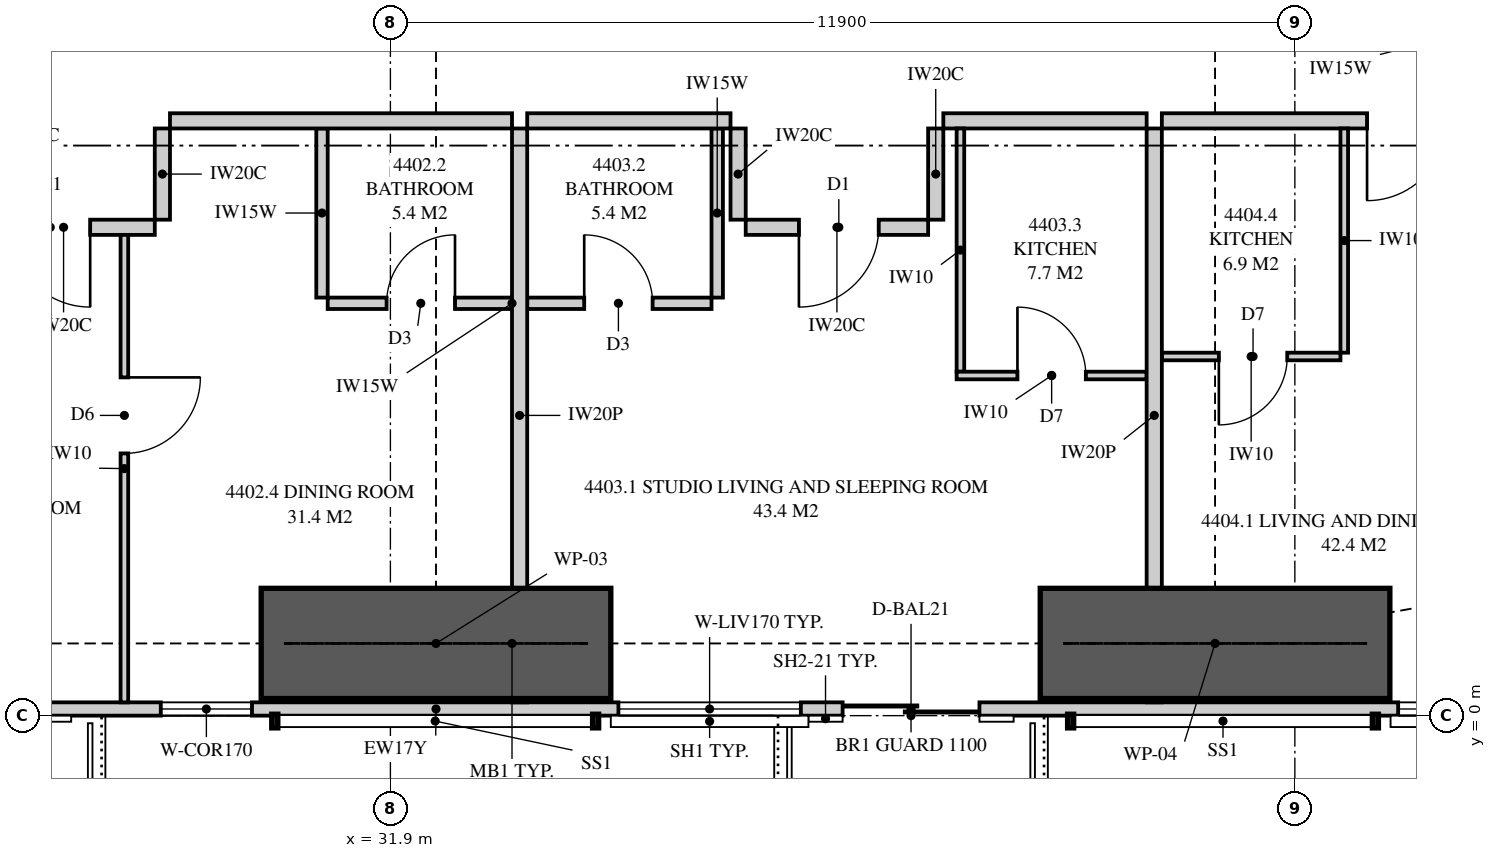
"""IFC4 building model, lengths in metres.
Left out: names, types, materials, properties, quantities, classifications, styles, units other than length and angle.
Written with IfcOpenShell. Run it as: python <this file> out.ifc"""

import sys

from ifc_helpers import new_model, si_unit, direction, frame, frame_2d, origin, place, context, subcontext, project, spatial, polyline, rectangle, outline, extrude, element, fill, save


model = new_model("IFC4")
c1 = context("Model", 3, precision=1e-05, world=origin(), true_north=direction((0.0, 1.0)))
c2 = subcontext(c1, "Body", "Model", "MODEL_VIEW")
j1 = project(units=[si_unit("LENGTHUNIT", "METRE"), si_unit("PLANEANGLEUNIT", "RADIAN")], contexts=[c1])
p1 = place(None, origin())
s1 = spatial("IfcSite", under=j1, at=p1, CompositionType="ELEMENT")
p2 = place(p1, origin())
s2 = spatial("IfcBuilding", under=s1, at=p2, CompositionType="ELEMENT")
p3 = place(p2, frame((0.0, 0.0, 164.4)))
s3 = spatial("IfcBuildingStorey", under=s2, at=p3, CompositionType="ELEMENT", Elevation=164.4)
p4 = place(p3, frame((15.051, 0.087, 0.0), z_axis=(0.0, 0.0, 1.0), x_axis=(1.0, 0.0, 0.0)))
e1 = element("IfcWall", 1, at=p4, inside=s3, PredefinedType="SOLIDWALL", context=c2, shape_type="SweptSolid", body=[
    extrude(outline(polyline([(0.0, 0.0), (34.897, 0.0), (34.897, 3.11), (27.91, 3.11), (27.91, 2.15), (27.836, 2.15), (27.836, 3.11), (27.699, 3.11), (27.699, 2.15), (7.199, 2.15), (7.199, 3.11), (7.062, 3.11), (7.062, 2.15), (6.987, 2.15), (6.987, 3.11), (0.0, 3.11), (0.0, 0.0)])), frame((0.0, 0.087, 0.0), z_axis=(0.0, -1.0, 0.0), x_axis=(1.0, 0.0, 0.0)), (0.0, 0.0, 1.0), 0.175),
])
p5 = place(p4, frame((1.824, 0.0, 0.4)))
e2 = element("IfcOpeningElement", 2, at=p5, cuts=e1, PredefinedType="OPENING", context=c2, shape_type="SweptSolid", body=[
    extrude(rectangle(XDim=2.4, YDim=1.7, at=frame_2d((1.2, 0.85))), frame((0.0, 0.097, 0.0), z_axis=(0.0, -1.0, 0.0), x_axis=(1.0, 0.0, 0.0)), (0.0, 0.0, 1.0), 0.195),
])
p6 = place(p4, frame((10.399, 0.0, 0.0)))
e3 = element("IfcOpeningElement", 3, at=p6, cuts=e1, PredefinedType="OPENING", context=c2, shape_type="SweptSolid", body=[
    extrude(rectangle(XDim=1.8, YDim=2.1, at=frame_2d((0.9, 1.05))), frame((0.0, 0.097, 0.0), z_axis=(0.0, -1.0, 0.0), x_axis=(1.0, 0.0, 0.0)), (0.0, 0.0, 1.0), 0.195),
])
p7 = place(p4, frame((13.827, 0.0, 0.4)))
e4 = element("IfcOpeningElement", 4, at=p7, cuts=e1, PredefinedType="OPENING", context=c2, shape_type="SweptSolid", body=[
    extrude(rectangle(XDim=1.2, YDim=1.7, at=frame_2d((0.6, 0.85))), frame((0.0, 0.097, 0.0), z_axis=(0.0, -1.0, 0.0), x_axis=(1.0, 0.0, 0.0)), (0.0, 0.0, 1.0), 0.195),
])
p8 = place(p4, frame((22.799, 0.0, 0.0)))
e5 = element("IfcOpeningElement", 5, at=p8, cuts=e1, PredefinedType="OPENING", context=c2, shape_type="SweptSolid", body=[
    extrude(rectangle(XDim=1.8, YDim=2.1, at=frame_2d((0.9, 1.05))), frame((0.0, 0.097, 0.0), z_axis=(0.0, -1.0, 0.0), x_axis=(1.0, 0.0, 0.0)), (0.0, 0.0, 1.0), 0.195),
])
p9 = place(p4, frame((19.849, 0.0, 0.4)))
e6 = element("IfcOpeningElement", 6, at=p9, cuts=e1, PredefinedType="OPENING", context=c2, shape_type="SweptSolid", body=[
    extrude(rectangle(XDim=2.4, YDim=1.7, at=frame_2d((1.2, 0.85))), frame((0.0, 0.097, 0.0), z_axis=(0.0, -1.0, 0.0), x_axis=(1.0, 0.0, 0.0)), (0.0, 0.0, 1.0), 0.195),
])
p10 = place(p4, frame((30.108, 0.0, 0.4)))
e7 = element("IfcOpeningElement", 7, at=p10, cuts=e1, PredefinedType="OPENING", context=c2, shape_type="SweptSolid", body=[
    extrude(rectangle(XDim=2.4, YDim=1.7, at=frame_2d((1.2, 0.85))), frame((0.0, 0.097, 0.0), z_axis=(0.0, -1.0, 0.0), x_axis=(1.0, 0.0, 0.0)), (0.0, 0.0, 1.0), 0.195),
])
p11 = place(p3, frame((33.6, 0.175, 0.0), z_axis=(0.0, 0.0, 1.0), x_axis=(0.0, 1.0, 0.0)))
e8 = element("IfcWall", 8, at=p11, inside=s3, PredefinedType="PARTITIONING", context=c2, shape_type="SweptSolid", body=[
    extrude(outline(polyline([(0.529, 2.15), (0.0, 2.15), (0.0, 0.0), (0.529, 0.0), (0.529, 0.625), (1.021, 0.625), (1.021, 0.0), (7.55, 0.0), (7.55, 3.11), (1.685, 3.11), (1.685, 2.15), (1.021, 2.15), (1.021, 1.525), (0.529, 1.525), (0.529, 2.15)])), frame((0.0, 0.1, 0.0), z_axis=(0.0, -1.0, 0.0), x_axis=(1.0, 0.0, 0.0)), (0.0, 0.0, 1.0), 0.2),
])
p12 = place(p3, frame((31.075, 5.425, 0.0), z_axis=(0.0, 0.0, 1.0), x_axis=(1.0, 0.0, 0.0)))
e9 = element("IfcWall", 9, at=p12, inside=s3, PredefinedType="PLUMBINGWALL", context=c2, shape_type="SweptSolid", body=[
    extrude(outline(polyline([(0.0, 0.0), (2.425, 0.0), (2.425, 3.11), (1.737, 3.11), (1.737, 2.541), (1.113, 2.541), (1.113, 3.11), (0.0, 3.11), (0.0, 0.0)])), frame((0.0, 0.075, 0.0), z_axis=(0.0, -1.0, 0.0), x_axis=(1.0, 0.0, 0.0)), (0.0, 0.0, 1.0), 0.15),
])
p13 = place(p12, frame((0.775, 0.0, 0.0)))
e10 = element("IfcOpeningElement", 10, at=p13, cuts=e9, PredefinedType="OPENING", context=c2, shape_type="SweptSolid", body=[
    extrude(rectangle(XDim=0.9, YDim=2.1, at=frame_2d((0.45, 1.05))), frame((0.0, 0.085, 0.0), z_axis=(0.0, -1.0, 0.0), x_axis=(1.0, 0.0, 0.0)), (0.0, 0.0, 1.0), 0.17),
])
p14 = place(p3, frame((31.0, 5.5, 0.0), z_axis=(0.0, 0.0, 1.0), x_axis=(0.0, 1.0, 0.0)))
e11 = element("IfcWall", 11, at=p14, inside=s3, PredefinedType="PLUMBINGWALL", context=c2, shape_type="SweptSolid", body=[
    extrude(rectangle(XDim=2.225, YDim=0.15, at=frame_2d((1.113, 0.0))), origin(), (0.0, 0.0, 1.0), 3.11),
])
p15 = place(p3, frame((28.4, 0.175, 0.0), z_axis=(0.0, 0.0, 1.0), x_axis=(0.0, 1.0, 0.0)))
e12 = element("IfcWall", 12, at=p15, inside=s3, PredefinedType="PARTITIONING", context=c2, shape_type="SweptSolid", body=[
    extrude(outline(polyline([(0.0, 0.0), (6.15, 0.0), (6.15, 3.11), (1.635, 3.11), (1.635, 2.15), (0.0, 2.15), (0.0, 3.11), (0.0, 0.0)])), frame((0.0, 0.05, 0.0), z_axis=(0.0, -1.0, 0.0), x_axis=(1.0, 0.0, 0.0)), (0.0, 0.0, 1.0), 0.1),
])
p16 = place(p15, frame((3.275, 0.0, 0.0)))
e13 = element("IfcOpeningElement", 13, at=p16, cuts=e12, PredefinedType="OPENING", context=c2, shape_type="SweptSolid", body=[
    extrude(rectangle(XDim=1.0, YDim=2.1, at=frame_2d((0.5, 1.05))), frame((0.0, 0.06, 0.0), z_axis=(0.0, -1.0, 0.0), x_axis=(1.0, 0.0, 0.0)), (0.0, 0.0, 1.0), 0.12),
])
p17 = place(p3, frame((41.95, 0.175, 0.0), z_axis=(0.0, 0.0, 1.0), x_axis=(0.0, 1.0, 0.0)))
e14 = element("IfcWall", 14, at=p17, inside=s3, PredefinedType="PARTITIONING", context=c2, shape_type="SweptSolid", body=[
    extrude(outline(polyline([(0.529, 2.15), (0.0, 2.15), (0.0, 0.0), (0.529, 0.0), (0.529, 0.876), (1.021, 0.876), (1.021, 0.0), (7.55, 0.0), (7.55, 3.11), (1.685, 3.11), (1.685, 2.15), (1.021, 2.15), (1.021, 1.274), (0.529, 1.274), (0.529, 2.15)])), frame((0.0, 0.1, 0.0), z_axis=(0.0, -1.0, 0.0), x_axis=(1.0, 0.0, 0.0)), (0.0, 0.0, 1.0), 0.2),
])
p18 = place(p3, frame((33.7, 7.825, 0.0), z_axis=(0.0, 0.0, 1.0), x_axis=(1.0, 0.0, 0.0)))
e15 = element("IfcWall", 15, at=p18, inside=s3, PredefinedType="PARTITIONING", context=c2, shape_type="SweptSolid", body=[
    extrude(rectangle(XDim=2.675, YDim=0.2, at=frame_2d((1.337, 0.0))), origin(), (0.0, 0.0, 1.0), 3.11),
])
p19 = place(p3, frame((33.7, 5.425, 0.0), z_axis=(0.0, 0.0, 1.0), x_axis=(1.0, 0.0, 0.0)))
e16 = element("IfcWall", 16, at=p19, inside=s3, PredefinedType="PLUMBINGWALL", context=c2, shape_type="SweptSolid", body=[
    extrude(rectangle(XDim=2.425, YDim=0.15, at=frame_2d((1.212, 0.0))), origin(), (0.0, 0.0, 1.0), 3.11),
])
p20 = place(p19, frame((0.75, 0.0, 0.0)))
e17 = element("IfcOpeningElement", 17, at=p20, cuts=e16, PredefinedType="OPENING", context=c2, shape_type="SweptSolid", body=[
    extrude(rectangle(XDim=0.9, YDim=2.1, at=frame_2d((0.45, 1.05))), frame((0.0, 0.085, 0.0), z_axis=(0.0, -1.0, 0.0), x_axis=(1.0, 0.0, 0.0)), (0.0, 0.0, 1.0), 0.17),
])
p21 = place(p3, frame((36.2, 5.5, 0.0), z_axis=(0.0, 0.0, 1.0), x_axis=(0.0, 1.0, 0.0)))
e18 = element("IfcWall", 18, at=p21, inside=s3, PredefinedType="PLUMBINGWALL", context=c2, shape_type="SweptSolid", body=[
    extrude(rectangle(XDim=2.225, YDim=0.15, at=frame_2d((1.113, 0.0))), origin(), (0.0, 0.0, 1.0), 3.11),
])
p22 = place(p3, frame((42.05, 7.825, 0.0), z_axis=(0.0, 0.0, 1.0), x_axis=(1.0, 0.0, 0.0)))
e19 = element("IfcWall", 19, at=p22, inside=s3, PredefinedType="PARTITIONING", context=c2, shape_type="SweptSolid", body=[
    extrude(outline(polyline([(0.0, 0.0), (3.9, 0.0), (3.9, 3.11), (1.037, 3.11), (1.037, 2.541), (0.363, 2.541), (0.363, 3.11), (0.0, 3.11), (0.0, 0.0)])), frame((0.0, 0.1, 0.0), z_axis=(0.0, -1.0, 0.0), x_axis=(1.0, 0.0, 0.0)), (0.0, 0.0, 1.0), 0.2),
])
p23 = place(p22, frame((2.7, 0.0, 0.0)))
e20 = element("IfcOpeningElement", 20, at=p23, cuts=e19, PredefinedType="OPENING", context=c2, shape_type="SweptSolid", body=[
    extrude(rectangle(XDim=1.05, YDim=2.2, at=frame_2d((0.525, 1.1))), frame((0.0, 0.11, 0.0), z_axis=(0.0, -1.0, 0.0), x_axis=(1.0, 0.0, 0.0)), (0.0, 0.0, 1.0), 0.22),
])
p24 = place(p3, frame((42.05, 4.725, 0.0), z_axis=(0.0, 0.0, 1.0), x_axis=(1.0, 0.0, 0.0)))
e21 = element("IfcWall", 21, at=p24, inside=s3, PredefinedType="PARTITIONING", context=c2, shape_type="SweptSolid", body=[
    extrude(outline(polyline([(0.0, 0.0), (2.35, 0.0), (2.35, 3.11), (0.987, 3.11), (0.987, 2.541), (0.413, 2.541), (0.413, 3.11), (0.0, 3.11), (0.0, 0.0)])), frame((0.0, 0.05, 0.0), z_axis=(0.0, -1.0, 0.0), x_axis=(1.0, 0.0, 0.0)), (0.0, 0.0, 1.0), 0.1),
])
p25 = place(p24, frame((0.75, 0.0, 0.0)))
e22 = element("IfcOpeningElement", 22, at=p25, cuts=e21, PredefinedType="OPENING", context=c2, shape_type="SweptSolid", body=[
    extrude(rectangle(XDim=0.9, YDim=2.1, at=frame_2d((0.45, 1.05))), frame((0.0, 0.06, 0.0), z_axis=(0.0, -1.0, 0.0), x_axis=(1.0, 0.0, 0.0)), (0.0, 0.0, 1.0), 0.12),
])
p26 = place(p3, frame((44.45, 4.775, 0.0), z_axis=(0.0, 0.0, 1.0), x_axis=(0.0, 1.0, 0.0)))
e23 = element("IfcWall", 23, at=p26, inside=s3, PredefinedType="PARTITIONING", context=c2, shape_type="SweptSolid", body=[
    extrude(rectangle(XDim=2.95, YDim=0.1, at=frame_2d((1.475, 0.0))), origin(), (0.0, 0.0, 1.0), 3.11),
])
p27 = place(p3, frame((29.0, 7.825, 0.0), z_axis=(0.0, 0.0, 1.0), x_axis=(1.0, 0.0, 0.0)))
e24 = element("IfcWall", 24, at=p27, inside=s3, PredefinedType="PARTITIONING", context=c2, shape_type="SweptSolid", body=[
    extrude(outline(polyline([(0.0, 0.0), (4.5, 0.0), (4.5, 3.11), (3.837, 3.11), (3.837, 2.541), (3.163, 2.541), (3.163, 3.11), (0.0, 3.11), (0.0, 0.0)])), frame((0.0, 0.1, 0.0), z_axis=(0.0, -1.0, 0.0), x_axis=(1.0, 0.0, 0.0)), (0.0, 0.0, 1.0), 0.2),
])
p28 = place(p3, frame((26.4, 6.425, 0.0), z_axis=(0.0, 0.0, 1.0), x_axis=(1.0, 0.0, 0.0)))
e25 = element("IfcWall", 25, at=p28, inside=s3, PredefinedType="PARTITIONING", context=c2, shape_type="SweptSolid", body=[
    extrude(rectangle(XDim=2.4, YDim=0.2, at=frame_2d((1.2, 0.0))), origin(), (0.0, 0.0, 1.0), 3.11),
])
p29 = place(p28, frame((0.5, 0.0, 0.0)))
e26 = element("IfcOpeningElement", 26, at=p29, cuts=e25, PredefinedType="OPENING", context=c2, shape_type="SweptSolid", body=[
    extrude(rectangle(XDim=1.05, YDim=2.2, at=frame_2d((0.525, 1.1))), frame((0.0, 0.11, 0.0), z_axis=(0.0, -1.0, 0.0), x_axis=(1.0, 0.0, 0.0)), (0.0, 0.0, 1.0), 0.22),
])
p30 = place(p3, frame((28.9, 7.725, 0.0), z_axis=(0.0, 0.0, 1.0), x_axis=(0.0, -1.0, 0.0)))
e27 = element("IfcWall", 27, at=p30, inside=s3, PredefinedType="PARTITIONING", context=c2, shape_type="SweptSolid", body=[
    extrude(rectangle(XDim=1.2, YDim=0.2, at=frame_2d((0.6, 0.0))), origin(), (0.0, 0.0, 1.0), 3.11),
])
p31 = place(p3, frame((39.175, 7.825, 0.0), z_axis=(0.0, 0.0, 1.0), x_axis=(1.0, 0.0, 0.0)))
e28 = element("IfcWall", 28, at=p31, inside=s3, PredefinedType="PARTITIONING", context=c2, shape_type="SweptSolid", body=[
    extrude(rectangle(XDim=2.675, YDim=0.2, at=frame_2d((1.337, 0.0))), origin(), (0.0, 0.0, 1.0), 3.11),
])
p32 = place(p3, frame((36.575, 6.425, 0.0), z_axis=(0.0, 0.0, 1.0), x_axis=(1.0, 0.0, 0.0)))
e29 = element("IfcWall", 29, at=p32, inside=s3, PredefinedType="PARTITIONING", context=c2, shape_type="SweptSolid", body=[
    extrude(rectangle(XDim=2.4, YDim=0.2, at=frame_2d((1.2, 0.0))), origin(), (0.0, 0.0, 1.0), 3.11),
])
p33 = place(p32, frame((0.7, 0.0, 0.0)))
e30 = element("IfcOpeningElement", 30, at=p33, cuts=e29, PredefinedType="OPENING", context=c2, shape_type="SweptSolid", body=[
    extrude(rectangle(XDim=1.05, YDim=2.2, at=frame_2d((0.525, 1.1))), frame((0.0, 0.11, 0.0), z_axis=(0.0, -1.0, 0.0), x_axis=(1.0, 0.0, 0.0)), (0.0, 0.0, 1.0), 0.22),
])
for number, where, z_axis, x_axis in (
    (31, (36.475, 7.725, 0.0), (0.0, 0.0, 1.0), (0.0, -1.0, 0.0)),
    (32, (39.075, 7.725, 0.0), (0.0, 0.0, 1.0), (0.0, -1.0, 0.0)),
):
    element("IfcWall", number, at=place(p3, frame(where, z_axis=z_axis, x_axis=x_axis)), inside=s3, PredefinedType="PARTITIONING", context=c2, shape_type="SweptSolid", body=[
        extrude(rectangle(XDim=1.2, YDim=0.2, at=frame_2d((0.6, 0.0))), origin(), (0.0, 0.0, 1.0), 3.11),
    ])
p34 = place(p3, frame((41.85, 4.475, 0.0), z_axis=(0.0, 0.0, 1.0), x_axis=(-1.0, 0.0, 0.0)))
e33 = element("IfcWall", 33, at=p34, inside=s3, PredefinedType="PARTITIONING", context=c2, shape_type="SweptSolid", body=[
    extrude(rectangle(XDim=2.5, YDim=0.1, at=frame_2d((1.25, 0.0))), origin(), (0.0, 0.0, 1.0), 3.11),
])
p35 = place(p34, frame((0.8, 0.0, 0.0)))
e34 = element("IfcOpeningElement", 34, at=p35, cuts=e33, PredefinedType="OPENING", context=c2, shape_type="SweptSolid", body=[
    extrude(rectangle(XDim=0.9, YDim=2.1, at=frame_2d((0.45, 1.05))), frame((0.0, 0.06, 0.0), z_axis=(0.0, -1.0, 0.0), x_axis=(1.0, 0.0, 0.0)), (0.0, 0.0, 1.0), 0.12),
])
p36 = place(p3, frame((39.4, 7.725, 0.0), z_axis=(0.0, 0.0, 1.0), x_axis=(0.0, -1.0, 0.0)))
e35 = element("IfcWall", 35, at=p36, inside=s3, PredefinedType="PARTITIONING", context=c2, shape_type="SweptSolid", body=[
    extrude(rectangle(XDim=3.2, YDim=0.1, at=frame_2d((1.6, 0.0))), origin(), (0.0, 0.0, 1.0), 3.11),
])
for number, where, z_axis, x_axis in (
    (36, (30.2, 0.95, 0.0), (0.0, 0.0, 1.0), (1.0, 0.0, 0.0)),
    (37, (40.45, 0.95, 0.0), (0.0, 0.0, 1.0), (1.0, 0.0, 0.0)),
):
    element("IfcWall", number, at=place(p3, frame(where, z_axis=z_axis, x_axis=x_axis)), inside=s3, PredefinedType="SHEAR", context=c2, shape_type="SweptSolid", body=[
        extrude(rectangle(XDim=4.6, YDim=1.45, at=frame_2d((2.3, 0.0))), origin(), (0.0, 0.0, 1.0), 3.35),
    ])
p37 = place(p7, origin())
e38 = element("IfcWindow", 38, at=p37, inside=s3, PartitioningType="SINGLE_PANEL", PredefinedType="WINDOW", context=c2, shape_type="SweptSolid", body=[
    extrude(rectangle(XDim=1.2, YDim=1.7, at=frame_2d((0.6, 0.85))), frame((0.0, 0.03, 0.0), z_axis=(0.0, -1.0, 0.0), x_axis=(1.0, 0.0, 0.0)), (0.0, 0.0, 1.0), 0.06),
])
fill(e4, e38)
p38 = place(p8, origin())
e39 = element("IfcDoor", 39, at=p38, inside=s3, OperationType="SLIDING_TO_LEFT", PredefinedType="DOOR", context=c2, shape_type="SweptSolid", body=[
    extrude(rectangle(XDim=1.8, YDim=2.1, at=frame_2d((0.9, 1.05))), frame((0.0, 0.025, 0.0), z_axis=(0.0, -1.0, 0.0), x_axis=(1.0, 0.0, 0.0)), (0.0, 0.0, 1.0), 0.05),
])
fill(e5, e39)
p39 = place(p9, origin())
e40 = element("IfcWindow", 40, at=p39, inside=s3, PartitioningType="SINGLE_PANEL", PredefinedType="WINDOW", context=c2, shape_type="SweptSolid", body=[
    extrude(rectangle(XDim=2.4, YDim=1.7, at=frame_2d((1.2, 0.85))), frame((0.0, 0.03, 0.0), z_axis=(0.0, -1.0, 0.0), x_axis=(1.0, 0.0, 0.0)), (0.0, 0.0, 1.0), 0.06),
])
fill(e6, e40)
p40 = place(p10, origin())
e41 = element("IfcWindow", 41, at=p40, inside=s3, PartitioningType="SINGLE_PANEL", PredefinedType="WINDOW", context=c2, shape_type="SweptSolid", body=[
    extrude(rectangle(XDim=2.4, YDim=1.7, at=frame_2d((1.2, 0.85))), frame((0.0, 0.03, 0.0), z_axis=(0.0, -1.0, 0.0), x_axis=(1.0, 0.0, 0.0)), (0.0, 0.0, 1.0), 0.06),
])
fill(e7, e41)
p41 = place(p29, frame((1.05, 0.0, 0.0), z_axis=(0.0, 0.0, 1.0), x_axis=(-1.0, 0.0, 0.0)))
e42 = element("IfcDoor", 42, at=p41, inside=s3, OperationType="SINGLE_SWING_LEFT", PredefinedType="DOOR", context=c2, shape_type="SweptSolid", body=[
    extrude(rectangle(XDim=1.05, YDim=2.2, at=frame_2d((0.525, 1.1))), frame((0.0, 0.025, 0.0), z_axis=(0.0, -1.0, 0.0), x_axis=(1.0, 0.0, 0.0)), (0.0, 0.0, 1.0), 0.05),
])
fill(e26, e42)
p42 = place(p13, origin())
e43 = element("IfcDoor", 43, at=p42, inside=s3, OperationType="SINGLE_SWING_RIGHT", PredefinedType="DOOR", context=c2, shape_type="SweptSolid", body=[
    extrude(rectangle(XDim=0.9, YDim=2.1, at=frame_2d((0.45, 1.05))), frame((0.0, 0.025, 0.0), z_axis=(0.0, -1.0, 0.0), x_axis=(1.0, 0.0, 0.0)), (0.0, 0.0, 1.0), 0.05),
])
fill(e10, e43)
p43 = place(p16, frame((1.0, 0.0, 0.0), z_axis=(0.0, 0.0, 1.0), x_axis=(-1.0, 0.0, 0.0)))
e44 = element("IfcDoor", 44, at=p43, inside=s3, OperationType="SINGLE_SWING_LEFT", PredefinedType="DOOR", context=c2, shape_type="SweptSolid", body=[
    extrude(rectangle(XDim=1.0, YDim=2.1, at=frame_2d((0.5, 1.05))), frame((0.0, 0.025, 0.0), z_axis=(0.0, -1.0, 0.0), x_axis=(1.0, 0.0, 0.0)), (0.0, 0.0, 1.0), 0.05),
])
fill(e13, e44)
p44 = place(p33, frame((1.05, 0.0, 0.0), z_axis=(0.0, 0.0, 1.0), x_axis=(-1.0, 0.0, 0.0)))
e45 = element("IfcDoor", 45, at=p44, inside=s3, OperationType="SINGLE_SWING_RIGHT", PredefinedType="DOOR", context=c2, shape_type="SweptSolid", body=[
    extrude(rectangle(XDim=1.05, YDim=2.2, at=frame_2d((0.525, 1.1))), frame((0.0, 0.025, 0.0), z_axis=(0.0, -1.0, 0.0), x_axis=(1.0, 0.0, 0.0)), (0.0, 0.0, 1.0), 0.05),
])
fill(e30, e45)
p45 = place(p20, origin())
e46 = element("IfcDoor", 46, at=p45, inside=s3, OperationType="SINGLE_SWING_LEFT", PredefinedType="DOOR", context=c2, shape_type="SweptSolid", body=[
    extrude(rectangle(XDim=0.9, YDim=2.1, at=frame_2d((0.45, 1.05))), frame((0.0, 0.025, 0.0), z_axis=(0.0, -1.0, 0.0), x_axis=(1.0, 0.0, 0.0)), (0.0, 0.0, 1.0), 0.05),
])
fill(e17, e46)
p46 = place(p23, frame((1.05, 0.0, 0.0), z_axis=(0.0, 0.0, 1.0), x_axis=(-1.0, 0.0, 0.0)))
e47 = element("IfcDoor", 47, at=p46, inside=s3, OperationType="SINGLE_SWING_RIGHT", PredefinedType="DOOR", context=c2, shape_type="SweptSolid", body=[
    extrude(rectangle(XDim=1.05, YDim=2.2, at=frame_2d((0.525, 1.1))), frame((0.0, 0.025, 0.0), z_axis=(0.0, -1.0, 0.0), x_axis=(1.0, 0.0, 0.0)), (0.0, 0.0, 1.0), 0.05),
])
fill(e20, e47)
p47 = place(p25, frame((0.9, 0.0, 0.0), z_axis=(0.0, 0.0, 1.0), x_axis=(-1.0, 0.0, 0.0)))
e48 = element("IfcDoor", 48, at=p47, inside=s3, OperationType="SINGLE_SWING_RIGHT", PredefinedType="DOOR", context=c2, shape_type="SweptSolid", body=[
    extrude(rectangle(XDim=0.9, YDim=2.1, at=frame_2d((0.45, 1.05))), frame((0.0, 0.025, 0.0), z_axis=(0.0, -1.0, 0.0), x_axis=(1.0, 0.0, 0.0)), (0.0, 0.0, 1.0), 0.05),
])
fill(e22, e48)
p48 = place(p35, frame((0.9, 0.0, 0.0), z_axis=(0.0, 0.0, 1.0), x_axis=(-1.0, 0.0, 0.0)))
e49 = element("IfcDoor", 49, at=p48, inside=s3, OperationType="SINGLE_SWING_LEFT", PredefinedType="DOOR", context=c2, shape_type="SweptSolid", body=[
    extrude(rectangle(XDim=0.9, YDim=2.1, at=frame_2d((0.45, 1.05))), frame((0.0, 0.025, 0.0), z_axis=(0.0, -1.0, 0.0), x_axis=(1.0, 0.0, 0.0)), (0.0, 0.0, 1.0), 0.05),
])
fill(e34, e49)
save(model, sys.argv[1])
